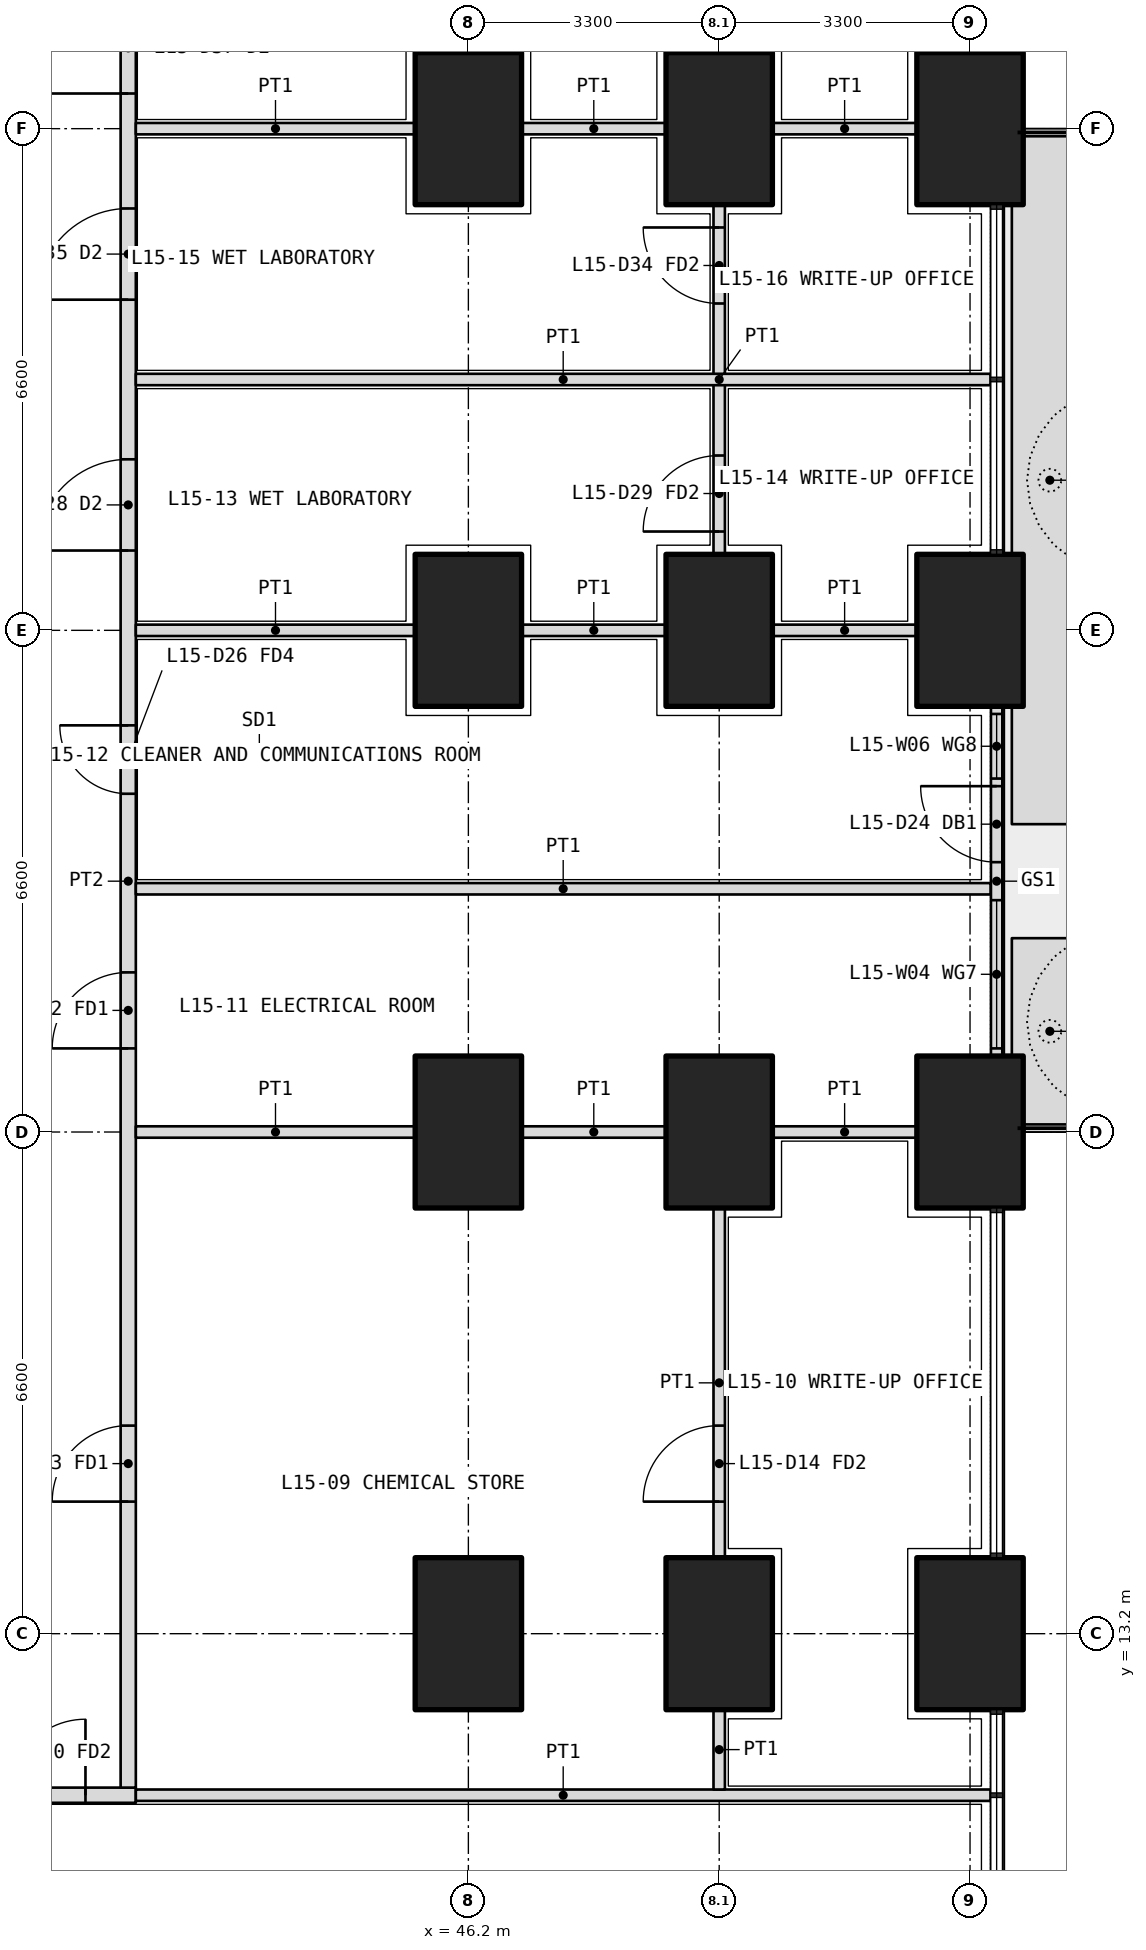
"""IFC4 building model, lengths in metres.
Left out: names, types, materials, properties, quantities, classifications, styles, units other than length and angle.
Written with IfcOpenShell. Run it as: python <this file> out.ifc"""

import sys

from ifc_helpers import new_model, si_unit, direction, frame, frame_2d, origin, origin_2d, place, context, subcontext, project, spatial, polyline, rectangle, outline, extrude, element, fill, save


model = new_model("IFC4")
c1 = context("Model", 3, precision=1e-05, world=origin(), true_north=direction((0.0, 1.0)))
c2 = subcontext(c1, "Body", "Model", "MODEL_VIEW")
j1 = project(units=[si_unit("LENGTHUNIT", "METRE"), si_unit("PLANEANGLEUNIT", "RADIAN")], contexts=[c1])
p1 = place(None, origin())
s1 = spatial("IfcSite", under=j1, at=p1, CompositionType="ELEMENT")
p2 = place(p1, origin())
s2 = spatial("IfcBuilding", under=s1, at=p2, CompositionType="ELEMENT")
p3 = place(p2, frame((0.0, 0.0, 67.5)))
s3 = spatial("IfcBuildingStorey", under=s2, at=p3, CompositionType="ELEMENT", Elevation=67.5)
for number, where, z_axis, x_axis in (
    (1, (52.8, 13.2, 0.0), (0.0, 0.0, 1.0), (0.0, 1.0, 0.0)),
    (2, (52.8, 19.8, 0.0), (0.0, 0.0, 1.0), (0.0, 1.0, 0.0)),
    (3, (52.8, 26.4, 0.0), (0.0, 0.0, 1.0), (0.0, 1.0, 0.0)),
    (4, (52.8, 33.0, 0.0), (0.0, 0.0, 1.0), (0.0, 1.0, 0.0)),
    (5, (49.5, 13.2, 0.0), (0.0, 0.0, 1.0), (0.0, 1.0, 0.0)),
    (6, (49.5, 19.8, 0.0), (0.0, 0.0, 1.0), (0.0, 1.0, 0.0)),
    (7, (49.5, 26.4, 0.0), (0.0, 0.0, 1.0), (0.0, 1.0, 0.0)),
    (8, (49.5, 33.0, 0.0), (0.0, 0.0, 1.0), (0.0, 1.0, 0.0)),
    (9, (46.2, 13.2, 0.0), (0.0, 0.0, 1.0), (0.0, 1.0, 0.0)),
    (10, (46.2, 19.8, 0.0), (0.0, 0.0, 1.0), (0.0, 1.0, 0.0)),
    (11, (46.2, 26.4, 0.0), (0.0, 0.0, 1.0), (0.0, 1.0, 0.0)),
    (12, (46.2, 33.0, 0.0), (0.0, 0.0, 1.0), (0.0, 1.0, 0.0)),
):
    element("IfcColumn", number, at=place(p3, frame(where, z_axis=z_axis, x_axis=x_axis)), inside=s3, PredefinedType="COLUMN", context=c2, shape_type="SweptSolid", body=[
        extrude(rectangle(XDim=2.0, YDim=1.4, at=origin_2d()), origin(), (0.0, 0.0, 1.0), 4.2),
    ])
p4 = place(p3, origin())
e13 = element("IfcWall", 13, at=p4, inside=s3, PredefinedType="USERDEFINED", context=c2, shape_type="SweptSolid", body=[
    extrude(outline(polyline([(53.35, 19.9), (54.35, 19.9), (54.35, 22.35), (53.35, 22.35), (53.35, 19.9)]), holes=[polyline([(53.5, 20.05), (54.2, 20.05), (54.2, 22.2), (53.5, 22.2), (53.5, 20.05)])]), origin(), (0.0, 0.0, 1.0), 1.05),
])
p5 = place(p3, origin())
e14 = element("IfcWall", 14, at=p5, inside=s3, PredefinedType="USERDEFINED", context=c2, shape_type="SweptSolid", body=[
    extrude(outline(polyline([(53.35, 23.85), (54.35, 23.85), (54.35, 32.9), (53.35, 32.9), (53.35, 23.85)]), holes=[polyline([(53.5, 24.0), (54.2, 24.0), (54.2, 32.75), (53.5, 32.75), (53.5, 24.0)])]), origin(), (0.0, 0.0, 1.0), 1.05),
])
p6 = place(p3, frame((53.15, 20.8, 0.0), z_axis=(0.0, 0.0, 1.0), x_axis=(0.0, 1.0, 0.0)))
e15 = element("IfcWall", 15, at=p6, inside=s3, PredefinedType="SOLIDWALL", context=c2, shape_type="SweptSolid", body=[
    extrude(rectangle(XDim=4.6, YDim=0.15, at=frame_2d((2.3, 0.0))), origin(), (0.0, 0.0, 1.0), 2.6),
])
p7 = place(p6, frame((2.55, 0.0, 0.0)))
e16 = element("IfcOpeningElement", 16, at=p7, cuts=e15, PredefinedType="OPENING", context=c2, shape_type="SweptSolid", body=[
    extrude(rectangle(XDim=1.0, YDim=2.4, at=frame_2d((0.5, 1.2))), frame((0.0, 0.085, 0.0), z_axis=(0.0, -1.0, 0.0), x_axis=(1.0, 0.0, 0.0)), (0.0, 0.0, 1.0), 0.17),
])
p8 = place(p6, frame((0.1, 0.0, 0.1)))
e17 = element("IfcOpeningElement", 17, at=p8, cuts=e15, PredefinedType="OPENING", context=c2, shape_type="SweptSolid", body=[
    extrude(rectangle(XDim=1.95, YDim=2.2, at=frame_2d((0.975, 1.1))), frame((0.0, 0.085, 0.0), z_axis=(0.0, -1.0, 0.0), x_axis=(1.0, 0.0, 0.0)), (0.0, 0.0, 1.0), 0.17),
])
p9 = place(p6, frame((3.65, 0.0, 0.1)))
e18 = element("IfcOpeningElement", 18, at=p9, cuts=e15, PredefinedType="OPENING", context=c2, shape_type="SweptSolid", body=[
    extrude(rectangle(XDim=0.85, YDim=2.2, at=frame_2d((0.425, 1.1))), frame((0.0, 0.085, 0.0), z_axis=(0.0, -1.0, 0.0), x_axis=(1.0, 0.0, 0.0)), (0.0, 0.0, 1.0), 0.17),
])
p10 = place(p3, frame((10.975, 11.075, 0.0), z_axis=(0.0, 0.0, 1.0), x_axis=(1.0, 0.0, 0.0)))
e19 = element("IfcWall", 19, at=p10, inside=s3, PredefinedType="PARTITIONING", context=c2, shape_type="SweptSolid", body=[
    extrude(rectangle(XDim=30.85, YDim=0.2, at=frame_2d((15.425, 0.0))), origin(), (0.0, 0.0, 1.0), 2.85),
])
p11 = place(p10, frame((2.312, 0.0, 0.0)))
e20 = element("IfcOpeningElement", 20, at=p11, cuts=e19, PredefinedType="OPENING", context=c2, shape_type="SweptSolid", body=[
    extrude(rectangle(XDim=1.0, YDim=2.1, at=frame_2d((0.5, 1.05))), frame((0.0, 0.11, 0.0), z_axis=(0.0, -1.0, 0.0), x_axis=(1.0, 0.0, 0.0)), (0.0, 0.0, 1.0), 0.22),
])
p12 = place(p10, frame((11.625, 0.0, 0.0)))
e21 = element("IfcOpeningElement", 21, at=p12, cuts=e19, PredefinedType="OPENING", context=c2, shape_type="SweptSolid", body=[
    extrude(rectangle(XDim=1.0, YDim=2.1, at=frame_2d((0.5, 1.05))), frame((0.0, 0.11, 0.0), z_axis=(0.0, -1.0, 0.0), x_axis=(1.0, 0.0, 0.0)), (0.0, 0.0, 1.0), 0.22),
])
p13 = place(p10, frame((23.075, 0.0, 0.0)))
e22 = element("IfcOpeningElement", 22, at=p13, cuts=e19, PredefinedType="OPENING", context=c2, shape_type="SweptSolid", body=[
    extrude(rectangle(XDim=1.2, YDim=2.1, at=frame_2d((0.6, 1.05))), frame((0.0, 0.11, 0.0), z_axis=(0.0, -1.0, 0.0), x_axis=(1.0, 0.0, 0.0)), (0.0, 0.0, 1.0), 0.22),
])
p14 = place(p10, frame((29.188, 0.0, 0.0)))
e23 = element("IfcOpeningElement", 23, at=p14, cuts=e19, PredefinedType="OPENING", context=c2, shape_type="SweptSolid", body=[
    extrude(rectangle(XDim=1.0, YDim=2.1, at=frame_2d((0.5, 1.05))), frame((0.0, 0.11, 0.0), z_axis=(0.0, -1.0, 0.0), x_axis=(1.0, 0.0, 0.0)), (0.0, 0.0, 1.0), 0.22),
])
p15 = place(p3, frame((41.725, 11.175, 0.0), z_axis=(0.0, 0.0, 1.0), x_axis=(0.0, 1.0, 0.0)))
e24 = element("IfcWall", 24, at=p15, inside=s3, PredefinedType="PARTITIONING", context=c2, shape_type="SweptSolid", body=[
    extrude(rectangle(XDim=23.85, YDim=0.2, at=frame_2d((11.925, 0.0))), origin(), (0.0, 0.0, 1.0), 2.85),
])
p16 = place(p15, frame((3.762, 0.0, 0.0)))
e25 = element("IfcOpeningElement", 25, at=p16, cuts=e24, PredefinedType="OPENING", context=c2, shape_type="SweptSolid", body=[
    extrude(rectangle(XDim=1.0, YDim=2.1, at=frame_2d((0.5, 1.05))), frame((0.0, 0.11, 0.0), z_axis=(0.0, -1.0, 0.0), x_axis=(1.0, 0.0, 0.0)), (0.0, 0.0, 1.0), 0.22),
])
p17 = place(p15, frame((9.725, 0.0, 0.0)))
e26 = element("IfcOpeningElement", 26, at=p17, cuts=e24, PredefinedType="OPENING", context=c2, shape_type="SweptSolid", body=[
    extrude(rectangle(XDim=1.0, YDim=2.1, at=frame_2d((0.5, 1.05))), frame((0.0, 0.11, 0.0), z_axis=(0.0, -1.0, 0.0), x_axis=(1.0, 0.0, 0.0)), (0.0, 0.0, 1.0), 0.22),
])
p18 = place(p15, frame((13.075, 0.0, 0.0)))
e27 = element("IfcOpeningElement", 27, at=p18, cuts=e24, PredefinedType="OPENING", context=c2, shape_type="SweptSolid", body=[
    extrude(rectangle(XDim=0.9, YDim=2.1, at=frame_2d((0.45, 1.05))), frame((0.0, 0.11, 0.0), z_axis=(0.0, -1.0, 0.0), x_axis=(1.0, 0.0, 0.0)), (0.0, 0.0, 1.0), 0.22),
])
p19 = place(p15, frame((16.275, 0.0, 0.0)))
e28 = element("IfcOpeningElement", 28, at=p19, cuts=e24, PredefinedType="OPENING", context=c2, shape_type="SweptSolid", body=[
    extrude(rectangle(XDim=1.2, YDim=2.1, at=frame_2d((0.6, 1.05))), frame((0.0, 0.11, 0.0), z_axis=(0.0, -1.0, 0.0), x_axis=(1.0, 0.0, 0.0)), (0.0, 0.0, 1.0), 0.22),
])
p20 = place(p15, frame((19.575, 0.0, 0.0)))
e29 = element("IfcOpeningElement", 29, at=p20, cuts=e24, PredefinedType="OPENING", context=c2, shape_type="SweptSolid", body=[
    extrude(rectangle(XDim=1.2, YDim=2.1, at=frame_2d((0.6, 1.05))), frame((0.0, 0.11, 0.0), z_axis=(0.0, -1.0, 0.0), x_axis=(1.0, 0.0, 0.0)), (0.0, 0.0, 1.0), 0.22),
])
p21 = place(p15, frame((22.288, 0.0, 0.0)))
e30 = element("IfcOpeningElement", 30, at=p21, cuts=e24, PredefinedType="OPENING", context=c2, shape_type="SweptSolid", body=[
    extrude(rectangle(XDim=1.2, YDim=2.1, at=frame_2d((0.6, 1.05))), frame((0.0, 0.11, 0.0), z_axis=(0.0, -1.0, 0.0), x_axis=(1.0, 0.0, 0.0)), (0.0, 0.0, 1.0), 0.22),
])
p22 = place(p3, frame((53.07, 11.075, 0.0), z_axis=(0.0, 0.0, 1.0), x_axis=(-1.0, 0.0, 0.0)))
e31 = element("IfcWall", 31, at=p22, inside=s3, PredefinedType="PARTITIONING", context=c2, shape_type="SweptSolid", body=[
    extrude(rectangle(XDim=11.245, YDim=0.15, at=frame_2d((5.623, 0.0))), origin(), (0.0, 0.0, 1.0), 2.6),
])
p23 = place(p3, frame((49.5, 11.15, 0.0), z_axis=(0.0, 0.0, 1.0), x_axis=(0.0, 1.0, 0.0)))
e32 = element("IfcWall", 32, at=p23, inside=s3, PredefinedType="PARTITIONING", context=c2, shape_type="SweptSolid", body=[
    extrude(rectangle(XDim=1.05, YDim=0.15, at=frame_2d((0.525, 0.0))), origin(), (0.0, 0.0, 1.0), 3.9),
])
p24 = place(p3, frame((49.5, 14.2, 0.0), z_axis=(0.0, 0.0, 1.0), x_axis=(0.0, 1.0, 0.0)))
e33 = element("IfcWall", 33, at=p24, inside=s3, PredefinedType="PARTITIONING", context=c2, shape_type="SweptSolid", body=[
    extrude(rectangle(XDim=4.6, YDim=0.15, at=frame_2d((2.3, 0.0))), origin(), (0.0, 0.0, 1.0), 3.9),
])
p25 = place(p24, frame((0.738, 0.0, 0.0)))
e34 = element("IfcOpeningElement", 34, at=p25, cuts=e33, PredefinedType="OPENING", context=c2, shape_type="SweptSolid", body=[
    extrude(rectangle(XDim=1.0, YDim=2.1, at=frame_2d((0.5, 1.05))), frame((0.0, 0.085, 0.0), z_axis=(0.0, -1.0, 0.0), x_axis=(1.0, 0.0, 0.0)), (0.0, 0.0, 1.0), 0.17),
])
p26 = place(p3, frame((49.5, 27.4, 0.0), z_axis=(0.0, 0.0, 1.0), x_axis=(0.0, 1.0, 0.0)))
e35 = element("IfcWall", 35, at=p26, inside=s3, PredefinedType="PARTITIONING", context=c2, shape_type="SweptSolid", body=[
    extrude(rectangle(XDim=4.6, YDim=0.15, at=frame_2d((2.3, 0.0))), origin(), (0.0, 0.0, 1.0), 3.9),
])
p27 = place(p26, frame((0.3, 0.0, 0.0)))
e36 = element("IfcOpeningElement", 36, at=p27, cuts=e35, PredefinedType="OPENING", context=c2, shape_type="SweptSolid", body=[
    extrude(rectangle(XDim=1.0, YDim=2.1, at=frame_2d((0.5, 1.05))), frame((0.0, 0.085, 0.0), z_axis=(0.0, -1.0, 0.0), x_axis=(1.0, 0.0, 0.0)), (0.0, 0.0, 1.0), 0.17),
])
p28 = place(p26, frame((3.3, 0.0, 0.0)))
e37 = element("IfcOpeningElement", 37, at=p28, cuts=e35, PredefinedType="OPENING", context=c2, shape_type="SweptSolid", body=[
    extrude(rectangle(XDim=1.0, YDim=2.1, at=frame_2d((0.5, 1.05))), frame((0.0, 0.085, 0.0), z_axis=(0.0, -1.0, 0.0), x_axis=(1.0, 0.0, 0.0)), (0.0, 0.0, 1.0), 0.17),
])
p29 = place(p3, frame((53.07, 23.0, 0.0), z_axis=(0.0, 0.0, 1.0), x_axis=(-1.0, 0.0, 0.0)))
e38 = element("IfcWall", 38, at=p29, inside=s3, PredefinedType="PARTITIONING", context=c2, shape_type="SweptSolid", body=[
    extrude(rectangle(XDim=11.245, YDim=0.15, at=frame_2d((5.623, 0.0))), origin(), (0.0, 0.0, 1.0), 2.6),
])
for number, where, z_axis, x_axis in (
    (39, (52.1, 26.4, 0.0), (0.0, 0.0, 1.0), (-1.0, 0.0, 0.0)),
    (40, (48.8, 26.4, 0.0), (0.0, 0.0, 1.0), (-1.0, 0.0, 0.0)),
):
    element("IfcWall", number, at=place(p3, frame(where, z_axis=z_axis, x_axis=x_axis)), inside=s3, PredefinedType="PARTITIONING", context=c2, shape_type="SweptSolid", body=[
        extrude(rectangle(XDim=1.9, YDim=0.15, at=frame_2d((0.95, 0.0))), origin(), (0.0, 0.0, 1.0), 2.85),
    ])
p30 = place(p3, frame((45.5, 26.4, 0.0), z_axis=(0.0, 0.0, 1.0), x_axis=(-1.0, 0.0, 0.0)))
e41 = element("IfcWall", 41, at=p30, inside=s3, PredefinedType="PARTITIONING", context=c2, shape_type="SweptSolid", body=[
    extrude(rectangle(XDim=3.675, YDim=0.15, at=frame_2d((1.837, 0.0))), origin(), (0.0, 0.0, 1.0), 2.85),
])
for number, where, z_axis, x_axis in (
    (42, (52.1, 19.8, 0.0), (0.0, 0.0, 1.0), (-1.0, 0.0, 0.0)),
    (43, (48.8, 19.8, 0.0), (0.0, 0.0, 1.0), (-1.0, 0.0, 0.0)),
):
    element("IfcWall", number, at=place(p3, frame(where, z_axis=z_axis, x_axis=x_axis)), inside=s3, PredefinedType="PARTITIONING", context=c2, shape_type="SweptSolid", body=[
        extrude(rectangle(XDim=1.9, YDim=0.15, at=frame_2d((0.95, 0.0))), origin(), (0.0, 0.0, 1.0), 2.85),
    ])
p31 = place(p3, frame((45.5, 19.8, 0.0), z_axis=(0.0, 0.0, 1.0), x_axis=(-1.0, 0.0, 0.0)))
e44 = element("IfcWall", 44, at=p31, inside=s3, PredefinedType="PARTITIONING", context=c2, shape_type="SweptSolid", body=[
    extrude(rectangle(XDim=3.675, YDim=0.15, at=frame_2d((1.837, 0.0))), origin(), (0.0, 0.0, 1.0), 2.85),
])
p32 = place(p3, frame((53.07, 29.7, 0.0), z_axis=(0.0, 0.0, 1.0), x_axis=(-1.0, 0.0, 0.0)))
e45 = element("IfcWall", 45, at=p32, inside=s3, PredefinedType="PARTITIONING", context=c2, shape_type="SweptSolid", body=[
    extrude(rectangle(XDim=11.245, YDim=0.15, at=frame_2d((5.623, 0.0))), origin(), (0.0, 0.0, 1.0), 2.6),
])
for number, where, z_axis, x_axis in (
    (46, (52.1, 33.0, 0.0), (0.0, 0.0, 1.0), (-1.0, 0.0, 0.0)),
    (47, (48.8, 33.0, 0.0), (0.0, 0.0, 1.0), (-1.0, 0.0, 0.0)),
):
    element("IfcWall", number, at=place(p3, frame(where, z_axis=z_axis, x_axis=x_axis)), inside=s3, PredefinedType="PARTITIONING", context=c2, shape_type="SweptSolid", body=[
        extrude(rectangle(XDim=1.9, YDim=0.15, at=frame_2d((0.95, 0.0))), origin(), (0.0, 0.0, 1.0), 2.85),
    ])
p33 = place(p3, frame((45.5, 33.0, 0.0), z_axis=(0.0, 0.0, 1.0), x_axis=(-1.0, 0.0, 0.0)))
e48 = element("IfcWall", 48, at=p33, inside=s3, PredefinedType="PARTITIONING", context=c2, shape_type="SweptSolid", body=[
    extrude(rectangle(XDim=3.675, YDim=0.15, at=frame_2d((1.837, 0.0))), origin(), (0.0, 0.0, 1.0), 2.85),
])
p34 = place(p7, origin())
e49 = element("IfcDoor", 49, at=p34, inside=s3, OperationType="SINGLE_SWING_RIGHT", PredefinedType="DOOR", context=c2, shape_type="SweptSolid", body=[
    extrude(rectangle(XDim=1.0, YDim=2.4, at=frame_2d((0.5, 1.2))), frame((0.0, 0.025, 0.0), z_axis=(0.0, -1.0, 0.0), x_axis=(1.0, 0.0, 0.0)), (0.0, 0.0, 1.0), 0.05),
])
fill(e16, e49)
p35 = place(p8, origin())
e50 = element("IfcWindow", 50, at=p35, inside=s3, PartitioningType="SINGLE_PANEL", PredefinedType="WINDOW", context=c2, shape_type="SweptSolid", body=[
    extrude(rectangle(XDim=1.95, YDim=2.2, at=frame_2d((0.975, 1.1))), frame((0.0, 0.03, 0.0), z_axis=(0.0, -1.0, 0.0), x_axis=(1.0, 0.0, 0.0)), (0.0, 0.0, 1.0), 0.06),
])
fill(e17, e50)
p36 = place(p9, origin())
e51 = element("IfcWindow", 51, at=p36, inside=s3, PartitioningType="SINGLE_PANEL", PredefinedType="WINDOW", context=c2, shape_type="SweptSolid", body=[
    extrude(rectangle(XDim=0.85, YDim=2.2, at=frame_2d((0.425, 1.1))), frame((0.0, 0.03, 0.0), z_axis=(0.0, -1.0, 0.0), x_axis=(1.0, 0.0, 0.0)), (0.0, 0.0, 1.0), 0.06),
])
fill(e18, e51)
p37 = place(p14, origin())
e52 = element("IfcDoor", 52, at=p37, inside=s3, OperationType="SINGLE_SWING_RIGHT", PredefinedType="DOOR", context=c2, shape_type="SweptSolid", body=[
    extrude(rectangle(XDim=1.0, YDim=2.1, at=frame_2d((0.5, 1.05))), frame((0.0, 0.025, 0.0), z_axis=(0.0, -1.0, 0.0), x_axis=(1.0, 0.0, 0.0)), (0.0, 0.0, 1.0), 0.05),
])
fill(e23, e52)
p38 = place(p16, origin())
e53 = element("IfcDoor", 53, at=p38, inside=s3, OperationType="SINGLE_SWING_LEFT", PredefinedType="DOOR", context=c2, shape_type="SweptSolid", body=[
    extrude(rectangle(XDim=1.0, YDim=2.1, at=frame_2d((0.5, 1.05))), frame((0.0, 0.025, 0.0), z_axis=(0.0, -1.0, 0.0), x_axis=(1.0, 0.0, 0.0)), (0.0, 0.0, 1.0), 0.05),
])
fill(e25, e53)
p39 = place(p25, origin())
e54 = element("IfcDoor", 54, at=p39, inside=s3, OperationType="SINGLE_SWING_LEFT", PredefinedType="DOOR", context=c2, shape_type="SweptSolid", body=[
    extrude(rectangle(XDim=1.0, YDim=2.1, at=frame_2d((0.5, 1.05))), frame((0.0, 0.025, 0.0), z_axis=(0.0, -1.0, 0.0), x_axis=(1.0, 0.0, 0.0)), (0.0, 0.0, 1.0), 0.05),
])
fill(e34, e54)
p40 = place(p17, origin())
e55 = element("IfcDoor", 55, at=p40, inside=s3, OperationType="SINGLE_SWING_LEFT", PredefinedType="DOOR", context=c2, shape_type="SweptSolid", body=[
    extrude(rectangle(XDim=1.0, YDim=2.1, at=frame_2d((0.5, 1.05))), frame((0.0, 0.025, 0.0), z_axis=(0.0, -1.0, 0.0), x_axis=(1.0, 0.0, 0.0)), (0.0, 0.0, 1.0), 0.05),
])
fill(e26, e55)
p41 = place(p18, origin())
e56 = element("IfcDoor", 56, at=p41, inside=s3, OperationType="SINGLE_SWING_RIGHT", PredefinedType="DOOR", context=c2, shape_type="SweptSolid", body=[
    extrude(rectangle(XDim=0.9, YDim=2.1, at=frame_2d((0.45, 1.05))), frame((0.0, 0.025, 0.0), z_axis=(0.0, -1.0, 0.0), x_axis=(1.0, 0.0, 0.0)), (0.0, 0.0, 1.0), 0.05),
])
fill(e27, e56)
p42 = place(p19, origin())
e57 = element("IfcDoor", 57, at=p42, inside=s3, OperationType="DOUBLE_DOOR_SINGLE_SWING", PredefinedType="DOOR", context=c2, shape_type="SweptSolid", body=[
    extrude(rectangle(XDim=1.2, YDim=2.1, at=frame_2d((0.6, 1.05))), frame((0.0, 0.025, 0.0), z_axis=(0.0, -1.0, 0.0), x_axis=(1.0, 0.0, 0.0)), (0.0, 0.0, 1.0), 0.05),
])
fill(e28, e57)
p43 = place(p27, origin())
e58 = element("IfcDoor", 58, at=p43, inside=s3, OperationType="SINGLE_SWING_LEFT", PredefinedType="DOOR", context=c2, shape_type="SweptSolid", body=[
    extrude(rectangle(XDim=1.0, YDim=2.1, at=frame_2d((0.5, 1.05))), frame((0.0, 0.025, 0.0), z_axis=(0.0, -1.0, 0.0), x_axis=(1.0, 0.0, 0.0)), (0.0, 0.0, 1.0), 0.05),
])
fill(e36, e58)
p44 = place(p20, origin())
e59 = element("IfcDoor", 59, at=p44, inside=s3, OperationType="DOUBLE_DOOR_SINGLE_SWING", PredefinedType="DOOR", context=c2, shape_type="SweptSolid", body=[
    extrude(rectangle(XDim=1.2, YDim=2.1, at=frame_2d((0.6, 1.05))), frame((0.0, 0.025, 0.0), z_axis=(0.0, -1.0, 0.0), x_axis=(1.0, 0.0, 0.0)), (0.0, 0.0, 1.0), 0.05),
])
fill(e29, e59)
p45 = place(p28, origin())
e60 = element("IfcDoor", 60, at=p45, inside=s3, OperationType="SINGLE_SWING_RIGHT", PredefinedType="DOOR", context=c2, shape_type="SweptSolid", body=[
    extrude(rectangle(XDim=1.0, YDim=2.1, at=frame_2d((0.5, 1.05))), frame((0.0, 0.025, 0.0), z_axis=(0.0, -1.0, 0.0), x_axis=(1.0, 0.0, 0.0)), (0.0, 0.0, 1.0), 0.05),
])
fill(e37, e60)
p46 = place(p21, origin())
e61 = element("IfcDoor", 61, at=p46, inside=s3, OperationType="DOUBLE_DOOR_SINGLE_SWING", PredefinedType="DOOR", context=c2, shape_type="SweptSolid", body=[
    extrude(rectangle(XDim=1.2, YDim=2.1, at=frame_2d((0.6, 1.05))), frame((0.0, 0.025, 0.0), z_axis=(0.0, -1.0, 0.0), x_axis=(1.0, 0.0, 0.0)), (0.0, 0.0, 1.0), 0.05),
])
fill(e30, e61)
save(model, sys.argv[1])
